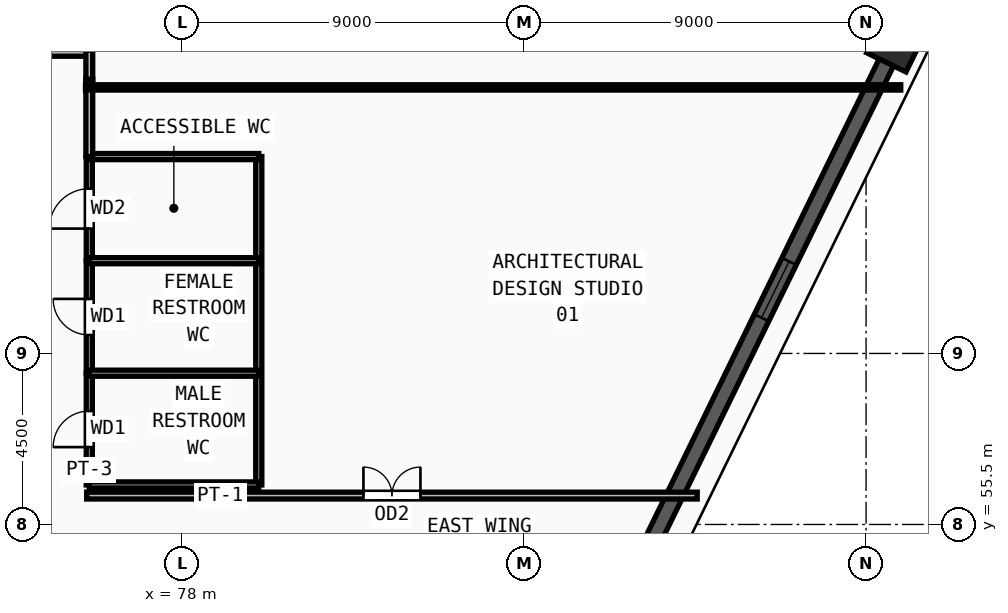
"""IFC4 building model, lengths in metres.
Left out: names, types, materials, properties, quantities, classifications, styles, units other than length and angle.
Written with IfcOpenShell. Run it as: python <this file> out.ifc"""

import sys

from ifc_helpers import new_model, si_unit, direction, frame, frame_2d, origin, origin_2d, place, context, subcontext, project, spatial, rectangle, extrude, source, transform, mapped, element, fill, save


model = new_model("IFC4")
c1 = context("Model", 3, precision=1e-05, world=origin(), true_north=direction((0.0, 1.0)))
c2 = subcontext(c1, "Body", "Model", "MODEL_VIEW")
j1 = project(units=[si_unit("LENGTHUNIT", "METRE"), si_unit("PLANEANGLEUNIT", "RADIAN")], contexts=[c1])
p1 = place(None, origin())
s1 = spatial("IfcSite", under=j1, at=p1, CompositionType="ELEMENT")
p2 = place(p1, origin())
s2 = spatial("IfcBuilding", under=s1, at=p2, CompositionType="ELEMENT")
p3 = place(p2, frame((0.0, 0.0, 102.0)))
s3 = spatial("IfcBuildingStorey", under=s2, at=p3, CompositionType="ELEMENT", Elevation=102.0)
m1 = source(origin(), c2, "Body", "SweptSolid", [
    extrude(rectangle(XDim=1.4, YDim=1.15, at=origin_2d()), origin(), (0.0, 0.0, 1.0), 3.75),
])
p4 = place(p3, frame((96.841, 68.288, 0.0), z_axis=(0.0, 0.0, 1.0), x_axis=(0.438998516526, 0.898487786499, 0.0)))
e1 = element("IfcColumn", 1, at=p4, inside=s3, PredefinedType="COLUMN", context=c2, shape_type="MappedRepresentation", body=[
    mapped(m1, transform((0.0, 0.0, 0.0), x_axis=(1.0, 0.0, 0.0), y_axis=(0.0, 1.0, 0.0), z_axis=(0.0, 0.0, 1.0), scale=1.0)),
])
p5 = place(p3, frame((84.836, 43.718, 0.0), z_axis=(0.0, 0.0, 1.0), x_axis=(0.439006754844, 0.898483761234, 0.0)))
e2 = element("IfcWall", 2, at=p5, inside=s3, PredefinedType="SOLIDWALL", context=c2, shape_type="SweptSolid", body=[
    extrude(rectangle(XDim=26.656, YDim=0.42, at=frame_2d((13.328, 0.0))), origin(), (0.0, 0.0, 1.0), 3.57),
])
m2 = source(origin(), c2, "Body", "SweptSolid", [
    extrude(rectangle(XDim=1.65, YDim=1.95, at=frame_2d((0.825, 0.975))), frame((0.0, 0.22, 0.0), z_axis=(0.0, -1.0, 0.0), x_axis=(1.0, 0.0, 0.0)), (0.0, 0.0, 1.0), 0.44),
])
p6 = place(p5, frame((7.389, 0.0, 0.55)))
e3 = element("IfcOpeningElement", 3, at=p6, cuts=e2, PredefinedType="OPENING", context=c2, shape_type="MappedRepresentation", body=[
    mapped(m2, transform((0.0, 0.0, 0.0), x_axis=(1.0, 0.0, 0.0), y_axis=(0.0, 1.0, 0.0), z_axis=(0.0, 0.0, 1.0), scale=1.0)),
])
p7 = place(p5, frame((19.167, 0.0, 0.55)))
e4 = element("IfcOpeningElement", 4, at=p7, cuts=e2, PredefinedType="OPENING", context=c2, shape_type="MappedRepresentation", body=[
    mapped(m2, transform((0.0, 0.0, 0.0), x_axis=(1.0, 0.0, 0.0), y_axis=(0.0, 1.0, 0.0), z_axis=(0.0, 0.0, 1.0), scale=1.0)),
])
p8 = place(p3, frame((75.56, 56.54, 0.0), z_axis=(0.0, 0.0, 1.0), x_axis=(0.0, 1.0, 0.0)))
e5 = element("IfcWall", 5, at=p8, inside=s3, PredefinedType="PARTITIONING", context=c2, shape_type="SweptSolid", body=[
    extrude(rectangle(XDim=2.94, YDim=0.16, at=frame_2d((1.47, 0.0))), origin(), (0.0, 0.0, 1.0), 3.57),
])
m3 = source(origin(), c2, "Body", "SweptSolid", [
    extrude(rectangle(XDim=0.95, YDim=2.15, at=frame_2d((0.475, 1.075))), frame((0.0, 0.09, 0.0), z_axis=(0.0, -1.0, 0.0), x_axis=(1.0, 0.0, 0.0)), (0.0, 0.0, 1.0), 0.18),
])
p9 = place(p8, frame((0.995, 0.0, 0.0)))
e6 = element("IfcOpeningElement", 6, at=p9, cuts=e5, PredefinedType="OPENING", context=c2, shape_type="MappedRepresentation", body=[
    mapped(m3, transform((0.0, 0.0, 0.0), x_axis=(1.0, 0.0, 0.0), y_axis=(0.0, 1.0, 0.0), z_axis=(0.0, 0.0, 1.0), scale=1.0)),
])
p10 = place(p3, frame((75.56, 59.48, 0.0), z_axis=(0.0, 0.0, 1.0), x_axis=(0.0, 1.0, 0.0)))
e7 = element("IfcWall", 7, at=p10, inside=s3, PredefinedType="PARTITIONING", context=c2, shape_type="SweptSolid", body=[
    extrude(rectangle(XDim=2.96, YDim=0.16, at=frame_2d((1.48, 0.0))), origin(), (0.0, 0.0, 1.0), 3.57),
])
p11 = place(p10, frame((1.005, 0.0, 0.0)))
e8 = element("IfcOpeningElement", 8, at=p11, cuts=e7, PredefinedType="OPENING", context=c2, shape_type="MappedRepresentation", body=[
    mapped(m3, transform((0.0, 0.0, 0.0), x_axis=(1.0, 0.0, 0.0), y_axis=(0.0, 1.0, 0.0), z_axis=(0.0, 0.0, 1.0), scale=1.0)),
])
p12 = place(p3, frame((75.56, 62.44, 0.0), z_axis=(0.0, 0.0, 1.0), x_axis=(0.0, 1.0, 0.0)))
e9 = element("IfcWall", 9, at=p12, inside=s3, PredefinedType="PARTITIONING", context=c2, shape_type="SweptSolid", body=[
    extrude(rectangle(XDim=2.74, YDim=0.16, at=frame_2d((1.37, 0.0))), origin(), (0.0, 0.0, 1.0), 3.57),
])
m4 = source(origin(), c2, "Body", "SweptSolid", [
    extrude(rectangle(XDim=1.05, YDim=2.15, at=frame_2d((0.525, 1.075))), frame((0.0, 0.09, 0.0), z_axis=(0.0, -1.0, 0.0), x_axis=(1.0, 0.0, 0.0)), (0.0, 0.0, 1.0), 0.18),
])
p13 = place(p12, frame((0.845, 0.0, 0.0)))
e10 = element("IfcOpeningElement", 10, at=p13, cuts=e9, PredefinedType="OPENING", context=c2, shape_type="MappedRepresentation", body=[
    mapped(m4, transform((0.0, 0.0, 0.0), x_axis=(1.0, 0.0, 0.0), y_axis=(0.0, 1.0, 0.0), z_axis=(0.0, 0.0, 1.0), scale=1.0)),
])
p14 = place(p3, frame((75.49, 56.26, 0.0), z_axis=(0.0, 0.0, 1.0), x_axis=(1.0, 0.0, 0.0)))
e11 = element("IfcWall", 11, at=p14, inside=s3, PredefinedType="PARTITIONING", context=c2, shape_type="SweptSolid", body=[
    extrude(rectangle(XDim=16.067, YDim=0.18, at=frame_2d((8.033, 0.0))), origin(), (0.0, 0.0, 1.0), 3.57),
])
m5 = source(origin(), c2, "Body", "SweptSolid", [
    extrude(rectangle(XDim=1.5, YDim=2.2, at=frame_2d((0.75, 1.1))), frame((0.0, 0.1, 0.0), z_axis=(0.0, -1.0, 0.0), x_axis=(1.0, 0.0, 0.0)), (0.0, 0.0, 1.0), 0.2),
])
p15 = place(p14, frame((7.284, 0.0, 0.0)))
e12 = element("IfcOpeningElement", 12, at=p15, cuts=e11, PredefinedType="OPENING", context=c2, shape_type="MappedRepresentation", body=[
    mapped(m5, transform((0.0, 0.0, 0.0), x_axis=(1.0, 0.0, 0.0), y_axis=(0.0, 1.0, 0.0), z_axis=(0.0, 0.0, 1.0), scale=1.0)),
])
p16 = place(p3, frame((65.785, 67.91, 0.0), z_axis=(0.0, 0.0, 1.0), x_axis=(1.0, 0.0, 0.0)))
e13 = element("IfcWall", 13, at=p16, inside=s3, PredefinedType="PARTITIONING", context=c2, shape_type="SweptSolid", body=[
    extrude(rectangle(XDim=9.845, YDim=0.18, at=frame_2d((4.922, 0.0))), origin(), (0.0, 0.0, 1.0), 3.57),
])
p17 = place(p16, frame((4.172, 0.0, 0.0)))
e14 = element("IfcOpeningElement", 14, at=p17, cuts=e13, PredefinedType="OPENING", context=c2, shape_type="MappedRepresentation", body=[
    mapped(m5, transform((0.0, 0.0, 0.0), x_axis=(1.0, 0.0, 0.0), y_axis=(0.0, 1.0, 0.0), z_axis=(0.0, 0.0, 1.0), scale=1.0)),
])
p18 = place(p3, frame((80.02, 56.54, 0.0), z_axis=(0.0, 0.0, 1.0), x_axis=(0.0, 1.0, 0.0)))
e15 = element("IfcWall", 15, at=p18, inside=s3, PredefinedType="PARTITIONING", context=c2, shape_type="SweptSolid", body=[
    extrude(rectangle(XDim=8.64, YDim=0.16, at=frame_2d((4.32, 0.0))), origin(), (0.0, 0.0, 1.0), 3.57),
])
for number, where, z_axis, x_axis in (
    (16, (75.56, 56.54, 0.0), (0.0, 0.0, 1.0), (1.0, 0.0, 0.0)),
    (17, (75.56, 59.48, 0.0), (0.0, 0.0, 1.0), (1.0, 0.0, 0.0)),
    (18, (75.56, 62.44, 0.0), (0.0, 0.0, 1.0), (1.0, 0.0, 0.0)),
    (19, (75.56, 65.18, 0.0), (0.0, 0.0, 1.0), (1.0, 0.0, 0.0)),
):
    element("IfcWall", number, at=place(p3, frame(where, z_axis=z_axis, x_axis=x_axis)), inside=s3, PredefinedType="PARTITIONING", context=c2, shape_type="SweptSolid", body=[
        extrude(rectangle(XDim=4.46, YDim=0.16, at=frame_2d((2.23, 0.0))), origin(), (0.0, 0.0, 1.0), 3.57),
    ])
p19 = place(p3, frame((75.56, 67.215, 0.0), z_axis=(0.0, 0.0, 1.0), x_axis=(0.0, -1.0, 0.0)))
e20 = element("IfcWall", 20, at=p19, inside=s3, PredefinedType="PARTITIONING", context=c2, shape_type="SweptSolid", body=[
    extrude(rectangle(XDim=2.035, YDim=0.18, at=frame_2d((1.018, 0.0))), origin(), (0.0, 0.0, 1.0), 3.57),
])
p20 = place(p3, frame((75.56, 67.98, 0.0), z_axis=(0.0, 0.0, 1.0), x_axis=(0.0, -1.0, 0.0)))
e21 = element("IfcWall", 21, at=p20, inside=s3, PredefinedType="PARTITIONING", context=c2, shape_type="SweptSolid", body=[
    extrude(rectangle(XDim=0.765, YDim=0.18, at=frame_2d((0.382, 0.0))), origin(), (0.0, 0.0, 1.0), 3.57),
])
p21 = place(p3, frame((75.46, 67.0, 0.0), z_axis=(0.0, 0.0, 1.0), x_axis=(1.0, 0.0, 0.0)))
e22 = element("IfcWall", 22, at=p21, inside=s3, PredefinedType="PARTITIONING", context=c2, shape_type="SweptSolid", body=[
    extrude(rectangle(XDim=21.453, YDim=0.14, at=frame_2d((10.727, 0.0))), origin(), (0.0, 0.0, 1.0), 2.755),
])
m6 = source(origin(), c2, "Body", "SweptSolid", [
    extrude(rectangle(XDim=1.65, YDim=1.95, at=frame_2d((0.825, 0.975))), frame((0.0, 0.03, 0.0), z_axis=(0.0, -1.0, 0.0), x_axis=(1.0, 0.0, 0.0)), (0.0, 0.0, 1.0), 0.06),
])
p22 = place(p7, origin())
e23 = element("IfcWindow", 23, at=p22, inside=s3, PartitioningType="DOUBLE_PANEL_VERTICAL", PredefinedType="WINDOW", context=c2, shape_type="MappedRepresentation", body=[
    mapped(m6, transform((0.0, 0.0, 0.0), x_axis=(1.0, 0.0, 0.0), y_axis=(0.0, 1.0, 0.0), z_axis=(0.0, 0.0, 1.0), scale=1.0)),
])
fill(e4, e23)
m7 = source(origin(), c2, "Body", "SweptSolid", [
    extrude(rectangle(XDim=0.95, YDim=2.15, at=frame_2d((0.475, 1.075))), frame((0.0, 0.025, 0.0), z_axis=(0.0, -1.0, 0.0), x_axis=(1.0, 0.0, 0.0)), (0.0, 0.0, 1.0), 0.05),
])
p23 = place(p9, origin())
e24 = element("IfcDoor", 24, at=p23, inside=s3, OperationType="SINGLE_SWING_LEFT", PredefinedType="DOOR", context=c2, shape_type="MappedRepresentation", body=[
    mapped(m7, transform((0.0, 0.0, 0.0), x_axis=(1.0, 0.0, 0.0), y_axis=(0.0, 1.0, 0.0), z_axis=(0.0, 0.0, 1.0), scale=1.0)),
])
fill(e6, e24)
p24 = place(p11, origin())
e25 = element("IfcDoor", 25, at=p24, inside=s3, OperationType="SINGLE_SWING_RIGHT", PredefinedType="DOOR", context=c2, shape_type="MappedRepresentation", body=[
    mapped(m7, transform((0.0, 0.0, 0.0), x_axis=(1.0, 0.0, 0.0), y_axis=(0.0, 1.0, 0.0), z_axis=(0.0, 0.0, 1.0), scale=1.0)),
])
fill(e8, e25)
m8 = source(origin(), c2, "Body", "SweptSolid", [
    extrude(rectangle(XDim=1.05, YDim=2.15, at=frame_2d((0.525, 1.075))), frame((0.0, 0.025, 0.0), z_axis=(0.0, -1.0, 0.0), x_axis=(1.0, 0.0, 0.0)), (0.0, 0.0, 1.0), 0.05),
])
p25 = place(p13, origin())
e26 = element("IfcDoor", 26, at=p25, inside=s3, OperationType="SINGLE_SWING_LEFT", PredefinedType="DOOR", context=c2, shape_type="MappedRepresentation", body=[
    mapped(m8, transform((0.0, 0.0, 0.0), x_axis=(1.0, 0.0, 0.0), y_axis=(0.0, 1.0, 0.0), z_axis=(0.0, 0.0, 1.0), scale=1.0)),
])
fill(e10, e26)
m9 = source(origin(), c2, "Body", "SweptSolid", [
    extrude(rectangle(XDim=1.5, YDim=2.2, at=frame_2d((0.75, 1.1))), frame((0.0, 0.025, 0.0), z_axis=(0.0, -1.0, 0.0), x_axis=(1.0, 0.0, 0.0)), (0.0, 0.0, 1.0), 0.05),
])
p26 = place(p15, origin())
e27 = element("IfcDoor", 27, at=p26, inside=s3, OperationType="DOUBLE_DOOR_SINGLE_SWING", PredefinedType="DOOR", context=c2, shape_type="MappedRepresentation", body=[
    mapped(m9, transform((0.0, 0.0, 0.0), x_axis=(1.0, 0.0, 0.0), y_axis=(0.0, 1.0, 0.0), z_axis=(0.0, 0.0, 1.0), scale=1.0)),
])
fill(e12, e27)
save(model, sys.argv[1])
